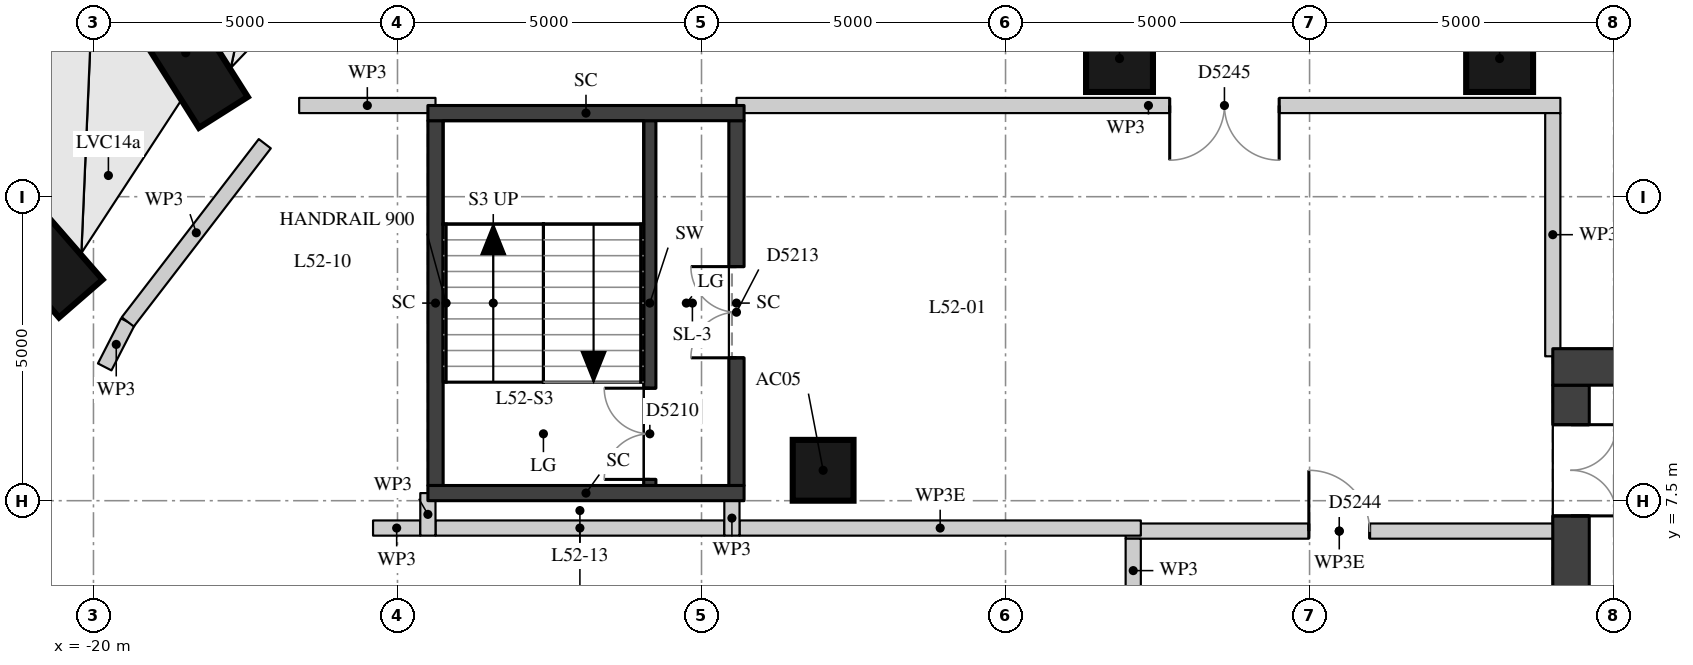
"""IFC4 building model, lengths in metres.
Left out: names, types, materials, properties, quantities, classifications, styles, units other than length and angle.
Written with IfcOpenShell. Run it as: python <this file> out.ifc"""

import sys

from ifc_helpers import new_model, si_unit, direction, frame, frame_2d, origin, origin_2d, place, context, subcontext, project, spatial, rectangle, extrude, element, fill, save


model = new_model("IFC4")
c1 = context("Model", 3, precision=1e-05, world=origin(), true_north=direction((0.0, 1.0)))
c2 = subcontext(c1, "Body", "Model", "MODEL_VIEW")
j1 = project(units=[si_unit("LENGTHUNIT", "METRE"), si_unit("PLANEANGLEUNIT", "RADIAN")], contexts=[c1])
p1 = place(None, origin())
s1 = spatial("IfcSite", under=j1, at=p1, CompositionType="ELEMENT")
p2 = place(p1, origin())
s2 = spatial("IfcBuilding", under=s1, at=p2, CompositionType="ELEMENT")
p3 = place(p2, frame((0.0, 0.0, 184.7)))
s3 = spatial("IfcBuildingStorey", under=s2, at=p3, CompositionType="ELEMENT", Elevation=184.7)
p4 = place(p3, frame((-17.864, 13.888, 0.398), z_axis=(-0.283468779631, 0.447917551257, 0.847947709621), x_axis=(0.45345373482, -0.716515895587, 0.530079882423)))
e1 = element("IfcColumn", 1, at=p4, inside=s3, PredefinedType="COLUMN", context=c2, shape_type="SweptSolid", body=[
    extrude(rectangle(XDim=1.5, YDim=0.95, at=origin_2d()), origin(), (0.0, 0.0, 1.0), 4.369),
])
p5 = place(p3, frame((-20.208, 10.825, 0.388), z_axis=(-0.339736382165, 0.390618300696, 0.855567959776), x_axis=(0.561469751943, -0.645560416575, 0.517690511991)))
e2 = element("IfcColumn", 2, at=p5, inside=s3, PredefinedType="COLUMN", context=c2, shape_type="SweptSolid", body=[
    extrude(rectangle(XDim=1.5, YDim=0.95, at=origin_2d()), origin(), (0.0, 0.0, 1.0), 4.352),
])
p6 = place(p3, frame((-8.0, 8.0, 0.0), z_axis=(0.0, 0.0, 1.0), x_axis=(1.0, 0.0, 0.0)))
e3 = element("IfcColumn", 3, at=p6, inside=s3, PredefinedType="COLUMN", context=c2, shape_type="SweptSolid", body=[
    extrude(rectangle(XDim=1.0, YDim=1.0, at=origin_2d()), origin(), (0.0, 0.0, 1.0), 4.5),
])
for number, where, z_axis, x_axis in (
    (4, (3.126, 14.772, 0.0), (0.0, 0.0, 1.0), (1.0, 0.0, 0.0)),
    (5, (-3.126, 14.772, 0.0), (0.0, 0.0, 1.0), (1.0, 0.0, 0.0)),
):
    element("IfcColumn", number, at=place(p3, frame(where, z_axis=z_axis, x_axis=x_axis)), inside=s3, PredefinedType="COLUMN", context=c2, shape_type="SweptSolid", body=[
        extrude(rectangle(XDim=1.1, YDim=1.1, at=origin_2d()), origin(), (0.0, 0.0, 1.0), 4.5),
    ])
p7 = place(p3, frame((4.3, -9.4, 0.0), z_axis=(0.0, 0.0, 1.0), x_axis=(0.0, 1.0, 0.0)))
e6 = element("IfcWall", 6, at=p7, inside=s3, PredefinedType="SHEAR", context=c2, shape_type="SweptSolid", body=[
    extrude(rectangle(XDim=18.8, YDim=0.6, at=frame_2d((9.4, 0.0))), origin(), (0.0, 0.0, 1.0), 4.22),
])
p8 = place(p7, frame((0.65, 0.0, 0.0)))
e7 = element("IfcOpeningElement", 7, at=p8, cuts=e6, PredefinedType="OPENING", context=c2, shape_type="SweptSolid", body=[
    extrude(rectangle(XDim=1.5, YDim=2.1, at=frame_2d((0.75, 1.05))), frame((0.0, 0.31, 0.0), z_axis=(0.0, -1.0, 0.0), x_axis=(1.0, 0.0, 0.0)), (0.0, 0.0, 1.0), 0.62),
])
p9 = place(p7, frame((3.75, 0.0, 0.0)))
e8 = element("IfcOpeningElement", 8, at=p9, cuts=e6, PredefinedType="OPENING", context=c2, shape_type="SweptSolid", body=[
    extrude(rectangle(XDim=1.8, YDim=2.1, at=frame_2d((0.9, 1.05))), frame((0.0, 0.31, 0.0), z_axis=(0.0, -1.0, 0.0), x_axis=(1.0, 0.0, 0.0)), (0.0, 0.0, 1.0), 0.62),
])
p10 = place(p7, frame((6.25, 0.0, 0.0)))
e9 = element("IfcOpeningElement", 9, at=p10, cuts=e6, PredefinedType="OPENING", context=c2, shape_type="SweptSolid", body=[
    extrude(rectangle(XDim=1.1, YDim=2.1, at=frame_2d((0.55, 1.05))), frame((0.0, 0.31, 0.0), z_axis=(0.0, -1.0, 0.0), x_axis=(1.0, 0.0, 0.0)), (0.0, 0.0, 1.0), 0.62),
])
p11 = place(p7, frame((8.9, 0.0, 0.0)))
e10 = element("IfcOpeningElement", 10, at=p11, cuts=e6, PredefinedType="OPENING", context=c2, shape_type="SweptSolid", body=[
    extrude(rectangle(XDim=1.0, YDim=2.1, at=frame_2d((0.5, 1.05))), frame((0.0, 0.31, 0.0), z_axis=(0.0, -1.0, 0.0), x_axis=(1.0, 0.0, 0.0)), (0.0, 0.0, 1.0), 0.62),
])
p12 = place(p7, frame((11.45, 0.0, 0.0)))
e11 = element("IfcOpeningElement", 11, at=p12, cuts=e6, PredefinedType="OPENING", context=c2, shape_type="SweptSolid", body=[
    extrude(rectangle(XDim=1.1, YDim=2.1, at=frame_2d((0.55, 1.05))), frame((0.0, 0.31, 0.0), z_axis=(0.0, -1.0, 0.0), x_axis=(1.0, 0.0, 0.0)), (0.0, 0.0, 1.0), 0.62),
])
p13 = place(p7, frame((13.25, 0.0, 0.0)))
e12 = element("IfcOpeningElement", 12, at=p13, cuts=e6, PredefinedType="OPENING", context=c2, shape_type="SweptSolid", body=[
    extrude(rectangle(XDim=1.8, YDim=2.1, at=frame_2d((0.9, 1.05))), frame((0.0, 0.31, 0.0), z_axis=(0.0, -1.0, 0.0), x_axis=(1.0, 0.0, 0.0)), (0.0, 0.0, 1.0), 0.62),
])
p14 = place(p7, frame((16.65, 0.0, 0.0)))
e13 = element("IfcOpeningElement", 13, at=p14, cuts=e6, PredefinedType="OPENING", context=c2, shape_type="SweptSolid", body=[
    extrude(rectangle(XDim=1.5, YDim=2.1, at=frame_2d((0.75, 1.05))), frame((0.0, 0.31, 0.0), z_axis=(0.0, -1.0, 0.0), x_axis=(1.0, 0.0, 0.0)), (0.0, 0.0, 1.0), 0.62),
])
p15 = place(p3, frame((4.0, 9.7, 0.0), z_axis=(0.0, 0.0, 1.0), x_axis=(1.0, 0.0, 0.0)))
e14 = element("IfcWall", 14, at=p15, inside=s3, PredefinedType="SHEAR", context=c2, shape_type="SweptSolid", body=[
    extrude(rectangle(XDim=12.0, YDim=0.6, at=frame_2d((6.0, 0.0))), origin(), (0.0, 0.0, 1.0), 4.22),
])
p16 = place(p3, frame((-10.85, 7.75, 0.0), z_axis=(0.0, 0.0, 1.0), x_axis=(0.0, 1.0, 0.0)))
e15 = element("IfcWall", 15, at=p16, inside=s3, PredefinedType="SHEAR", context=c2, shape_type="SweptSolid", body=[
    extrude(rectangle(XDim=6.0, YDim=0.2, at=frame_2d((3.0, 0.0))), origin(), (0.0, 0.0, 1.0), 4.22),
])
p17 = place(p16, frame((0.1, 0.0, 0.0)))
e16 = element("IfcOpeningElement", 16, at=p17, cuts=e15, PredefinedType="OPENING", context=c2, shape_type="SweptSolid", body=[
    extrude(rectangle(XDim=1.5, YDim=2.1, at=frame_2d((0.75, 1.05))), frame((0.0, 0.11, 0.0), z_axis=(0.0, -1.0, 0.0), x_axis=(1.0, 0.0, 0.0)), (0.0, 0.0, 1.0), 0.22),
])
p18 = place(p3, frame((-14.375, 7.75, -0.45), z_axis=(0.0, 0.0, 1.0), x_axis=(0.0, 1.0, 0.0)))
e17 = element("IfcWall", 17, at=p18, inside=s3, PredefinedType="SHEAR", context=c2, shape_type="SweptSolid", body=[
    extrude(rectangle(XDim=6.0, YDim=0.25, at=frame_2d((3.0, 0.0))), origin(), (0.0, 0.0, 1.0), 4.67),
])
p19 = place(p3, frame((-9.425, 7.75, -0.45), z_axis=(0.0, 0.0, 1.0), x_axis=(0.0, 1.0, 0.0)))
e18 = element("IfcWall", 18, at=p19, inside=s3, PredefinedType="SHEAR", context=c2, shape_type="SweptSolid", body=[
    extrude(rectangle(XDim=6.0, YDim=0.25, at=frame_2d((3.0, 0.0))), origin(), (0.0, 0.0, 1.0), 4.67),
])
p20 = place(p19, frame((2.1, 0.0, 0.45)))
e19 = element("IfcOpeningElement", 19, at=p20, cuts=e18, PredefinedType="OPENING", context=c2, shape_type="SweptSolid", body=[
    extrude(rectangle(XDim=1.5, YDim=2.1, at=frame_2d((0.75, 1.05))), frame((0.0, 0.135, 0.0), z_axis=(0.0, -1.0, 0.0), x_axis=(1.0, 0.0, 0.0)), (0.0, 0.0, 1.0), 0.27),
])
for number, where, z_axis, x_axis in (
    (20, (-14.5, 13.875, -0.45), (0.0, 0.0, 1.0), (1.0, 0.0, 0.0)),
    (21, (-14.5, 7.625, -0.45), (0.0, 0.0, 1.0), (1.0, 0.0, 0.0)),
):
    element("IfcWall", number, at=place(p3, frame(where, z_axis=z_axis, x_axis=x_axis)), inside=s3, PredefinedType="SHEAR", context=c2, shape_type="SweptSolid", body=[
        extrude(rectangle(XDim=5.2, YDim=0.25, at=frame_2d((2.6, 0.0))), origin(), (0.0, 0.0, 1.0), 4.67),
    ])
p21 = place(p3, frame((-19.436, 10.441, 0.0), z_axis=(0.0, 0.0, 1.0), x_axis=(-0.456102398343, -0.889927301652, 0.0)))
e22 = element("IfcWall", 22, at=p21, inside=s3, PredefinedType="PARTITIONING", context=c2, shape_type="SweptSolid", body=[
    extrude(rectangle(XDim=0.833, YDim=0.25, at=frame_2d((0.417, 0.0))), origin(), (0.0, 0.0, 1.0), 4.22),
])
p22 = place(p3, frame((-17.182, 13.371, 0.0), z_axis=(0.0, 0.0, 1.0), x_axis=(-0.609573495828, -0.792729558666, 0.0)))
e23 = element("IfcWall", 23, at=p22, inside=s3, PredefinedType="PARTITIONING", context=c2, shape_type="SweptSolid", body=[
    extrude(rectangle(XDim=3.696, YDim=0.25, at=frame_2d((1.848, 0.0))), origin(), (0.0, 0.0, 1.0), 4.22),
])
p23 = place(p3, frame((-3.025, 7.0, 0.0), z_axis=(0.0, 0.0, 1.0), x_axis=(1.0, 0.0, 0.0)))
e24 = element("IfcWall", 24, at=p23, inside=s3, PredefinedType="PARTITIONING", context=c2, shape_type="SweptSolid", body=[
    extrude(rectangle(XDim=7.027, YDim=0.25, at=frame_2d((3.513, 0.0))), origin(), (0.0, 0.0, 1.0), 3.67),
])
p24 = place(p23, frame((3.013, 0.0, 0.0)))
e25 = element("IfcOpeningElement", 25, at=p24, cuts=e24, PredefinedType="OPENING", context=c2, shape_type="SweptSolid", body=[
    extrude(rectangle(XDim=1.0, YDim=2.1, at=frame_2d((0.5, 1.05))), frame((0.0, 0.135, 0.0), z_axis=(0.0, -1.0, 0.0), x_axis=(1.0, 0.0, 0.0)), (0.0, 0.0, 1.0), 0.27),
])
p25 = place(p3, frame((-15.402, 7.05, 0.0), z_axis=(0.0, 0.0, 1.0), x_axis=(1.0, 0.0, 0.0)))
e26 = element("IfcWall", 26, at=p25, inside=s3, PredefinedType="PARTITIONING", context=c2, shape_type="SweptSolid", body=[
    extrude(rectangle(XDim=0.777, YDim=0.25, at=frame_2d((0.389, 0.0))), origin(), (0.0, 0.0, 1.0), 4.22),
])
p26 = place(p3, frame((-14.375, 7.05, 0.0), z_axis=(0.0, 0.0, 1.0), x_axis=(1.0, 0.0, 0.0)))
e27 = element("IfcWall", 27, at=p26, inside=s3, PredefinedType="PARTITIONING", context=c2, shape_type="SweptSolid", body=[
    extrude(rectangle(XDim=4.75, YDim=0.25, at=frame_2d((2.375, 0.0))), origin(), (0.0, 0.0, 1.0), 4.22),
])
p27 = place(p3, frame((-9.375, 7.05, 0.0), z_axis=(0.0, 0.0, 1.0), x_axis=(1.0, 0.0, 0.0)))
e28 = element("IfcWall", 28, at=p27, inside=s3, PredefinedType="PARTITIONING", context=c2, shape_type="SweptSolid", body=[
    extrude(rectangle(XDim=6.6, YDim=0.25, at=frame_2d((3.3, 0.0))), origin(), (0.0, 0.0, 1.0), 3.67),
])
p28 = place(p3, frame((-16.617, 14.0, 0.0), z_axis=(0.0, 0.0, 1.0), x_axis=(1.0, 0.0, 0.0)))
e29 = element("IfcWall", 29, at=p28, inside=s3, PredefinedType="PARTITIONING", context=c2, shape_type="SweptSolid", body=[
    extrude(rectangle(XDim=2.242, YDim=0.25, at=frame_2d((1.121, 0.0))), origin(), (0.0, 0.0, 1.0), 4.22),
])
p29 = place(p3, frame((-9.425, 14.0, 0.0), z_axis=(0.0, 0.0, 1.0), x_axis=(1.0, 0.0, 0.0)))
e30 = element("IfcWall", 30, at=p29, inside=s3, PredefinedType="PARTITIONING", context=c2, shape_type="SweptSolid", body=[
    extrude(rectangle(XDim=13.55, YDim=0.25, at=frame_2d((6.775, 0.0))), origin(), (0.0, 0.0, 1.0), 4.22),
])
p30 = place(p29, frame((7.125, 0.0, 0.0)))
e31 = element("IfcOpeningElement", 31, at=p30, cuts=e30, PredefinedType="OPENING", context=c2, shape_type="SweptSolid", body=[
    extrude(rectangle(XDim=1.8, YDim=2.1, at=frame_2d((0.9, 1.05))), frame((0.0, 0.135, 0.0), z_axis=(0.0, -1.0, 0.0), x_axis=(1.0, 0.0, 0.0)), (0.0, 0.0, 1.0), 0.27),
])
p31 = place(p3, frame((-14.5, 6.925, 0.0), z_axis=(0.0, 0.0, 1.0), x_axis=(0.0, 1.0, 0.0)))
e32 = element("IfcWall", 32, at=p31, inside=s3, PredefinedType="PARTITIONING", context=c2, shape_type="SweptSolid", body=[
    extrude(rectangle(XDim=0.7, YDim=0.25, at=frame_2d((0.35, 0.0))), origin(), (0.0, 0.0, 1.0), 4.22),
])
p32 = place(p3, frame((-9.5, 6.925, 0.0), z_axis=(0.0, 0.0, 1.0), x_axis=(0.0, 1.0, 0.0)))
e33 = element("IfcWall", 33, at=p32, inside=s3, PredefinedType="PARTITIONING", context=c2, shape_type="SweptSolid", body=[
    extrude(rectangle(XDim=0.577, YDim=0.25, at=frame_2d((0.289, 0.0))), origin(), (0.0, 0.0, 1.0), 4.22),
])
p33 = place(p3, frame((-2.9, 5.825, 0.0), z_axis=(0.0, 0.0, 1.0), x_axis=(0.0, 1.0, 0.0)))
e34 = element("IfcWall", 34, at=p33, inside=s3, PredefinedType="PARTITIONING", context=c2, shape_type="SweptSolid", body=[
    extrude(rectangle(XDim=1.05, YDim=0.25, at=frame_2d((0.525, 0.0))), origin(), (0.0, 0.0, 1.0), 4.22),
])
p34 = place(p3, frame((4.0, 9.875, 0.0), z_axis=(0.0, 0.0, 1.0), x_axis=(0.0, 1.0, 0.0)))
e35 = element("IfcWall", 35, at=p34, inside=s3, PredefinedType="PARTITIONING", context=c2, shape_type="SweptSolid", body=[
    extrude(rectangle(XDim=4.0, YDim=0.25, at=frame_2d((2.0, 0.0))), origin(), (0.0, 0.0, 1.0), 4.22),
])
p35 = place(p14, origin())
e36 = element("IfcDoor", 36, at=p35, inside=s3, OperationType="DOUBLE_DOOR_SINGLE_SWING", PredefinedType="DOOR", context=c2, shape_type="SweptSolid", body=[
    extrude(rectangle(XDim=1.5, YDim=2.1, at=frame_2d((0.75, 1.05))), frame((0.0, 0.025, 0.0), z_axis=(0.0, -1.0, 0.0), x_axis=(1.0, 0.0, 0.0)), (0.0, 0.0, 1.0), 0.05),
])
fill(e13, e36)
p36 = place(p17, origin())
e37 = element("IfcDoor", 37, at=p36, inside=s3, OperationType="DOUBLE_DOOR_SINGLE_SWING", PredefinedType="DOOR", context=c2, shape_type="SweptSolid", body=[
    extrude(rectangle(XDim=1.5, YDim=2.1, at=frame_2d((0.75, 1.05))), frame((0.0, 0.025, 0.0), z_axis=(0.0, -1.0, 0.0), x_axis=(1.0, 0.0, 0.0)), (0.0, 0.0, 1.0), 0.05),
])
fill(e16, e37)
p37 = place(p20, origin())
e38 = element("IfcDoor", 38, at=p37, inside=s3, OperationType="DOUBLE_DOOR_SINGLE_SWING", PredefinedType="DOOR", context=c2, shape_type="SweptSolid", body=[
    extrude(rectangle(XDim=1.5, YDim=2.1, at=frame_2d((0.75, 1.05))), frame((0.0, 0.025, 0.0), z_axis=(0.0, -1.0, 0.0), x_axis=(1.0, 0.0, 0.0)), (0.0, 0.0, 1.0), 0.05),
])
fill(e19, e38)
p38 = place(p30, origin())
e39 = element("IfcDoor", 39, at=p38, inside=s3, OperationType="DOUBLE_DOOR_SINGLE_SWING", PredefinedType="DOOR", context=c2, shape_type="SweptSolid", body=[
    extrude(rectangle(XDim=1.8, YDim=2.1, at=frame_2d((0.9, 1.05))), frame((0.0, 0.025, 0.0), z_axis=(0.0, -1.0, 0.0), x_axis=(1.0, 0.0, 0.0)), (0.0, 0.0, 1.0), 0.05),
])
fill(e31, e39)
p39 = place(p24, origin())
e40 = element("IfcDoor", 40, at=p39, inside=s3, OperationType="SINGLE_SWING_LEFT", PredefinedType="DOOR", context=c2, shape_type="SweptSolid", body=[
    extrude(rectangle(XDim=1.0, YDim=2.1, at=frame_2d((0.5, 1.05))), frame((0.0, 0.025, 0.0), z_axis=(0.0, -1.0, 0.0), x_axis=(1.0, 0.0, 0.0)), (0.0, 0.0, 1.0), 0.05),
])
fill(e25, e40)
save(model, sys.argv[1])
